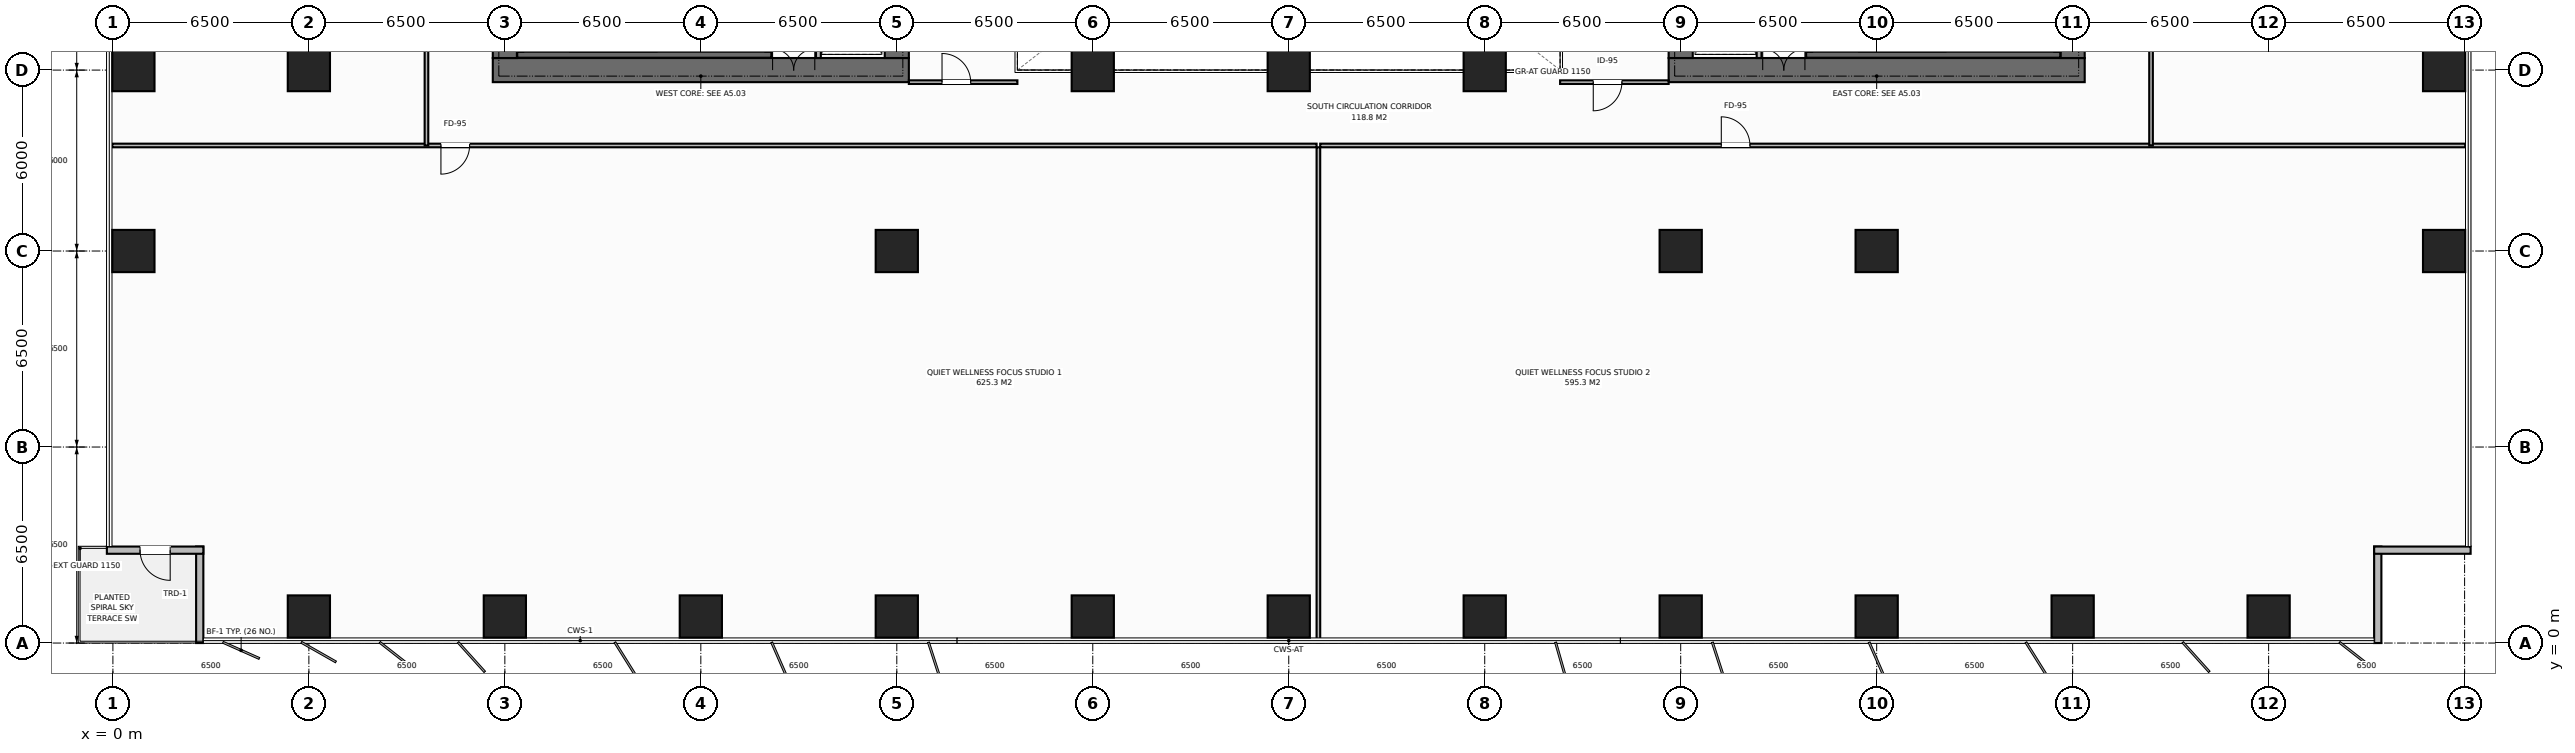
"""IFC4 building model, lengths in metres.
Left out: names, types, materials, properties, quantities, classifications, styles, units other than length and angle.
Written with IfcOpenShell. Run it as: python <this file> out.ifc"""

import sys

from ifc_helpers import new_model, si_unit, direction, frame, frame_2d, origin, origin_2d, place, context, subcontext, project, spatial, rectangle, extrude, element, fill, save


model = new_model("IFC4")
c1 = context("Model", 3, precision=1e-05, world=origin(), true_north=direction((0.0, 1.0)))
c2 = subcontext(c1, "Body", "Model", "MODEL_VIEW")
j1 = project(units=[si_unit("LENGTHUNIT", "METRE"), si_unit("PLANEANGLEUNIT", "RADIAN")], contexts=[c1])
p1 = place(None, origin())
s1 = spatial("IfcSite", under=j1, at=p1, CompositionType="ELEMENT")
p2 = place(p1, origin())
s2 = spatial("IfcBuilding", under=s1, at=p2, CompositionType="ELEMENT")
p3 = place(p2, frame((0.0, 0.0, 31.6)))
s3 = spatial("IfcBuildingStorey", under=s2, at=p3, CompositionType="ELEMENT", Elevation=31.6)
p4 = place(p3, frame((12.6, 19.0, 0.0), z_axis=(0.0, 0.0, 1.0), x_axis=(1.0, 0.0, 0.0)))
e1 = element("IfcWall", 1, at=p4, inside=s3, PredefinedType="SHEAR", context=c2, shape_type="SweptSolid", body=[
    extrude(rectangle(XDim=13.8, YDim=0.8, at=frame_2d((6.9, 0.0))), origin(), (0.0, 0.0, 1.0), 3.8),
])
p5 = place(p4, frame((9.28, 0.0, 0.0)))
e2 = element("IfcOpeningElement", 2, at=p5, cuts=e1, PredefinedType="OPENING", context=c2, shape_type="SweptSolid", body=[
    extrude(rectangle(XDim=1.4, YDim=2.2, at=frame_2d((0.7, 1.1))), frame((0.0, 0.41, 0.0), z_axis=(0.0, -1.0, 0.0), x_axis=(1.0, 0.0, 0.0)), (0.0, 0.0, 1.0), 0.82),
])
p6 = place(p3, frame((13.0, 19.4, 0.0), z_axis=(0.0, 0.0, 1.0), x_axis=(0.0, 1.0, 0.0)))
e3 = element("IfcWall", 3, at=p6, inside=s3, PredefinedType="SHEAR", context=c2, shape_type="SweptSolid", body=[
    extrude(rectangle(XDim=13.2, YDim=0.8, at=frame_2d((6.6, 0.0))), origin(), (0.0, 0.0, 1.0), 3.8),
])
p7 = place(p6, frame((4.65, 0.0, 0.0)))
e4 = element("IfcOpeningElement", 4, at=p7, cuts=e3, PredefinedType="OPENING", context=c2, shape_type="SweptSolid", body=[
    extrude(rectangle(XDim=1.4, YDim=2.2, at=frame_2d((0.7, 1.1))), frame((0.0, 0.41, 0.0), z_axis=(0.0, -1.0, 0.0), x_axis=(1.0, 0.0, 0.0)), (0.0, 0.0, 1.0), 0.82),
])
p8 = place(p3, frame((26.0, 19.4, 0.0), z_axis=(0.0, 0.0, 1.0), x_axis=(0.0, 1.0, 0.0)))
e5 = element("IfcWall", 5, at=p8, inside=s3, PredefinedType="SHEAR", context=c2, shape_type="SweptSolid", body=[
    extrude(rectangle(XDim=13.2, YDim=0.8, at=frame_2d((6.6, 0.0))), origin(), (0.0, 0.0, 1.0), 3.8),
])
p9 = place(p3, frame((51.6, 19.0, 0.0), z_axis=(0.0, 0.0, 1.0), x_axis=(1.0, 0.0, 0.0)))
e6 = element("IfcWall", 6, at=p9, inside=s3, PredefinedType="SHEAR", context=c2, shape_type="SweptSolid", body=[
    extrude(rectangle(XDim=13.8, YDim=0.8, at=frame_2d((6.9, 0.0))), origin(), (0.0, 0.0, 1.0), 3.8),
])
p10 = place(p9, frame((3.12, 0.0, 0.0)))
e7 = element("IfcOpeningElement", 7, at=p10, cuts=e6, PredefinedType="OPENING", context=c2, shape_type="SweptSolid", body=[
    extrude(rectangle(XDim=1.4, YDim=2.2, at=frame_2d((0.7, 1.1))), frame((0.0, 0.41, 0.0), z_axis=(0.0, -1.0, 0.0), x_axis=(1.0, 0.0, 0.0)), (0.0, 0.0, 1.0), 0.82),
])
p11 = place(p3, frame((52.0, 19.4, 0.0), z_axis=(0.0, 0.0, 1.0), x_axis=(0.0, 1.0, 0.0)))
e8 = element("IfcWall", 8, at=p11, inside=s3, PredefinedType="SHEAR", context=c2, shape_type="SweptSolid", body=[
    extrude(rectangle(XDim=13.2, YDim=0.8, at=frame_2d((6.6, 0.0))), origin(), (0.0, 0.0, 1.0), 3.8),
])
p12 = place(p3, frame((65.0, 19.4, 0.0), z_axis=(0.0, 0.0, 1.0), x_axis=(0.0, 1.0, 0.0)))
e9 = element("IfcWall", 9, at=p12, inside=s3, PredefinedType="SHEAR", context=c2, shape_type="SweptSolid", body=[
    extrude(rectangle(XDim=13.2, YDim=0.8, at=frame_2d((6.6, 0.0))), origin(), (0.0, 0.0, 1.0), 3.8),
])
p13 = place(p12, frame((8.05, 0.0, 0.0)))
e10 = element("IfcOpeningElement", 10, at=p13, cuts=e9, PredefinedType="OPENING", context=c2, shape_type="SweptSolid", body=[
    extrude(rectangle(XDim=1.3, YDim=2.2, at=frame_2d((0.65, 1.1))), frame((0.0, 0.41, 0.0), z_axis=(0.0, -1.0, 0.0), x_axis=(1.0, 0.0, 0.0)), (0.0, 0.0, 1.0), 0.82),
])
for number, where, z_axis, x_axis in (
    (11, (13.41, 19.51, 0.0), (0.0, 0.0, 1.0), (1.0, 0.0, 0.0)),
    (12, (56.16, 19.51, 0.0), (0.0, 0.0, 1.0), (1.0, 0.0, 0.0)),
):
    element("IfcWall", number, at=place(p3, frame(where, z_axis=z_axis, x_axis=x_axis)), inside=s3, PredefinedType="SHEAR", context=c2, shape_type="SweptSolid", body=[
        extrude(rectangle(XDim=8.43, YDim=0.2, at=frame_2d((4.215, 0.0))), origin(), (0.0, 0.0, 1.0), 3.8),
    ])
for number, where, z_axis, x_axis in (
    (13, (58.5, 13.0, 0.0), (0.0, 0.0, 1.0), (1.0, 0.0, 0.0)),
    (14, (6.5, 19.0, 0.0), (0.0, 0.0, 1.0), (1.0, 0.0, 0.0)),
    (15, (32.5, 19.0, 0.0), (0.0, 0.0, 1.0), (1.0, 0.0, 0.0)),
    (16, (39.0, 19.0, 0.0), (0.0, 0.0, 1.0), (1.0, 0.0, 0.0)),
    (17, (45.5, 19.0, 0.0), (0.0, 0.0, 1.0), (1.0, 0.0, 0.0)),
    (18, (26.0, 13.0, 0.0), (0.0, 0.0, 1.0), (1.0, 0.0, 0.0)),
    (19, (52.0, 13.0, 0.0), (0.0, 0.0, 1.0), (1.0, 0.0, 0.0)),
    (20, (6.5, 0.88, 0.0), (0.0, 0.0, 1.0), (1.0, 0.0, 0.0)),
    (21, (13.0, 0.88, 0.0), (0.0, 0.0, 1.0), (1.0, 0.0, 0.0)),
    (22, (19.5, 0.88, 0.0), (0.0, 0.0, 1.0), (1.0, 0.0, 0.0)),
    (23, (26.0, 0.88, 0.0), (0.0, 0.0, 1.0), (1.0, 0.0, 0.0)),
    (24, (32.5, 0.88, 0.0), (0.0, 0.0, 1.0), (1.0, 0.0, 0.0)),
    (25, (39.0, 0.88, 0.0), (0.0, 0.0, 1.0), (1.0, 0.0, 0.0)),
    (26, (45.5, 0.88, 0.0), (0.0, 0.0, 1.0), (1.0, 0.0, 0.0)),
    (27, (52.0, 0.88, 0.0), (0.0, 0.0, 1.0), (1.0, 0.0, 0.0)),
    (28, (58.5, 0.88, 0.0), (0.0, 0.0, 1.0), (1.0, 0.0, 0.0)),
    (29, (65.0, 0.88, 0.0), (0.0, 0.0, 1.0), (1.0, 0.0, 0.0)),
    (30, (71.5, 0.88, 0.0), (0.0, 0.0, 1.0), (1.0, 0.0, 0.0)),
    (31, (0.68, 13.0, 0.0), (0.0, 0.0, 1.0), (1.0, 0.0, 0.0)),
    (32, (77.32, 13.0, 0.0), (0.0, 0.0, 1.0), (1.0, 0.0, 0.0)),
    (33, (0.68, 19.0, 0.0), (0.0, 0.0, 1.0), (1.0, 0.0, 0.0)),
    (34, (77.32, 19.0, 0.0), (0.0, 0.0, 1.0), (1.0, 0.0, 0.0)),
):
    element("IfcColumn", number, at=place(p3, frame(where, z_axis=z_axis, x_axis=x_axis)), inside=s3, PredefinedType="COLUMN", context=c2, shape_type="SweptSolid", body=[
        extrude(rectangle(XDim=1.4, YDim=1.4, at=origin_2d()), origin(), (0.0, 0.0, 1.0), 3.8),
    ])
p14 = place(p3, frame((2.88, 0.0, 0.0), z_axis=(0.0, 0.0, 1.0), x_axis=(0.0, 1.0, 0.0)))
e35 = element("IfcWall", 35, at=p14, inside=s3, PredefinedType="STANDARD", context=c2, shape_type="SweptSolid", body=[
    extrude(rectangle(XDim=3.2, YDim=0.24, at=frame_2d((1.6, 0.0))), origin(), (0.0, 0.0, 1.0), 3.55),
])
p15 = place(p3, frame((3.0, 3.08, 0.0), z_axis=(0.0, 0.0, 1.0), x_axis=(-1.0, 0.0, 0.0)))
e36 = element("IfcWall", 36, at=p15, inside=s3, PredefinedType="STANDARD", context=c2, shape_type="SweptSolid", body=[
    extrude(rectangle(XDim=3.2, YDim=0.24, at=frame_2d((1.6, 0.0))), origin(), (0.0, 0.0, 1.0), 3.55),
])
p16 = place(p15, frame((1.1, 0.0, 0.0)))
e37 = element("IfcOpeningElement", 37, at=p16, cuts=e36, PredefinedType="OPENING", context=c2, shape_type="SweptSolid", body=[
    extrude(rectangle(XDim=1.0, YDim=2.2, at=frame_2d((0.5, 1.1))), frame((0.0, 0.13, 0.0), z_axis=(0.0, -1.0, 0.0), x_axis=(1.0, 0.0, 0.0)), (0.0, 0.0, 1.0), 0.26),
])
for number, where, z_axis, x_axis in (
    (38, (75.12, 3.2, 0.0), (0.0, 0.0, 1.0), (0.0, -1.0, 0.0)),
    (39, (78.2, 3.08, 0.0), (0.0, 0.0, 1.0), (-1.0, 0.0, 0.0)),
):
    element("IfcWall", number, at=place(p3, frame(where, z_axis=z_axis, x_axis=x_axis)), inside=s3, PredefinedType="STANDARD", context=c2, shape_type="SweptSolid", body=[
        extrude(rectangle(XDim=3.2, YDim=0.24, at=frame_2d((1.6, 0.0))), origin(), (0.0, 0.0, 1.0), 3.55),
    ])
p17 = place(p3, frame((23.4, 19.4, 0.0), z_axis=(0.0, 0.0, 1.0), x_axis=(0.0, 1.0, 0.0)))
e40 = element("IfcWall", 40, at=p17, inside=s3, PredefinedType="STANDARD", context=c2, shape_type="SweptSolid", body=[
    extrude(rectangle(XDim=13.2, YDim=0.16, at=frame_2d((6.6, 0.0))), origin(), (0.0, 0.0, 1.0), 3.55),
])
p18 = place(p17, frame((0.55, 0.0, 0.0)))
e41 = element("IfcOpeningElement", 41, at=p18, cuts=e40, PredefinedType="OPENING", context=c2, shape_type="SweptSolid", body=[
    extrude(rectangle(XDim=1.1, YDim=2.2, at=frame_2d((0.55, 1.1))), frame((0.0, 0.09, 0.0), z_axis=(0.0, -1.0, 0.0), x_axis=(1.0, 0.0, 0.0)), (0.0, 0.0, 1.0), 0.18),
])
p19 = place(p17, frame((2.7, 0.0, 0.0)))
e42 = element("IfcOpeningElement", 42, at=p19, cuts=e40, PredefinedType="OPENING", context=c2, shape_type="SweptSolid", body=[
    extrude(rectangle(XDim=1.1, YDim=2.2, at=frame_2d((0.55, 1.1))), frame((0.0, 0.09, 0.0), z_axis=(0.0, -1.0, 0.0), x_axis=(1.0, 0.0, 0.0)), (0.0, 0.0, 1.0), 0.18),
])
p20 = place(p3, frame((54.6, 19.4, 0.0), z_axis=(0.0, 0.0, 1.0), x_axis=(0.0, 1.0, 0.0)))
e43 = element("IfcWall", 43, at=p20, inside=s3, PredefinedType="STANDARD", context=c2, shape_type="SweptSolid", body=[
    extrude(rectangle(XDim=13.2, YDim=0.16, at=frame_2d((6.6, 0.0))), origin(), (0.0, 0.0, 1.0), 3.55),
])
p21 = place(p20, frame((0.55, 0.0, 0.0)))
e44 = element("IfcOpeningElement", 44, at=p21, cuts=e43, PredefinedType="OPENING", context=c2, shape_type="SweptSolid", body=[
    extrude(rectangle(XDim=1.1, YDim=2.2, at=frame_2d((0.55, 1.1))), frame((0.0, 0.09, 0.0), z_axis=(0.0, -1.0, 0.0), x_axis=(1.0, 0.0, 0.0)), (0.0, 0.0, 1.0), 0.18),
])
p22 = place(p20, frame((2.7, 0.0, 0.0)))
e45 = element("IfcOpeningElement", 45, at=p22, cuts=e43, PredefinedType="OPENING", context=c2, shape_type="SweptSolid", body=[
    extrude(rectangle(XDim=1.1, YDim=2.2, at=frame_2d((0.55, 1.1))), frame((0.0, 0.09, 0.0), z_axis=(0.0, -1.0, 0.0), x_axis=(1.0, 0.0, 0.0)), (0.0, 0.0, 1.0), 0.18),
])
p23 = place(p3, frame((26.4, 18.6, 0.0), z_axis=(0.0, 0.0, 1.0), x_axis=(1.0, 0.0, 0.0)))
e46 = element("IfcWall", 46, at=p23, inside=s3, PredefinedType="PARTITIONING", context=c2, shape_type="SweptSolid", body=[
    extrude(rectangle(XDim=3.6, YDim=0.12, at=frame_2d((1.8, 0.0))), origin(), (0.0, 0.0, 1.0), 3.55),
])
p24 = place(p23, frame((1.1, 0.0, 0.0)))
e47 = element("IfcOpeningElement", 47, at=p24, cuts=e46, PredefinedType="OPENING", context=c2, shape_type="SweptSolid", body=[
    extrude(rectangle(XDim=0.95, YDim=2.15, at=frame_2d((0.475, 1.075))), frame((0.0, 0.07, 0.0), z_axis=(0.0, -1.0, 0.0), x_axis=(1.0, 0.0, 0.0)), (0.0, 0.0, 1.0), 0.14),
])
p25 = place(p3, frame((48.0, 18.6, 0.0), z_axis=(0.0, 0.0, 1.0), x_axis=(1.0, 0.0, 0.0)))
e48 = element("IfcWall", 48, at=p25, inside=s3, PredefinedType="PARTITIONING", context=c2, shape_type="SweptSolid", body=[
    extrude(rectangle(XDim=3.6, YDim=0.12, at=frame_2d((1.8, 0.0))), origin(), (0.0, 0.0, 1.0), 3.55),
])
p26 = place(p25, frame((1.1, 0.0, 0.0)))
e49 = element("IfcOpeningElement", 49, at=p26, cuts=e48, PredefinedType="OPENING", context=c2, shape_type="SweptSolid", body=[
    extrude(rectangle(XDim=0.95, YDim=2.15, at=frame_2d((0.475, 1.075))), frame((0.0, 0.07, 0.0), z_axis=(0.0, -1.0, 0.0), x_axis=(1.0, 0.0, 0.0)), (0.0, 0.0, 1.0), 0.14),
])
p27 = place(p3, frame((39.983, 0.02, 0.0), z_axis=(0.0, 0.0, 1.0), x_axis=(0.0, 1.0, 0.0)))
e50 = element("IfcWall", 50, at=p27, inside=s3, PredefinedType="PARTITIONING", context=c2, shape_type="SweptSolid", body=[
    extrude(rectangle(XDim=16.42, YDim=0.12, at=frame_2d((8.21, 0.0))), origin(), (0.0, 0.0, 1.0), 3.55),
])
p28 = place(p3, frame((-0.02, 16.5, 0.0), z_axis=(0.0, 0.0, 1.0), x_axis=(1.0, 0.0, 0.0)))
e51 = element("IfcWall", 51, at=p28, inside=s3, PredefinedType="PARTITIONING", context=c2, shape_type="SweptSolid", body=[
    extrude(rectangle(XDim=39.943, YDim=0.12, at=frame_2d((19.972, 0.0))), origin(), (0.0, 0.0, 1.0), 3.55),
])
p29 = place(p28, frame((10.9, 0.0, 0.0)))
e52 = element("IfcOpeningElement", 52, at=p29, cuts=e51, PredefinedType="OPENING", context=c2, shape_type="SweptSolid", body=[
    extrude(rectangle(XDim=0.95, YDim=2.15, at=frame_2d((0.475, 1.075))), frame((0.0, 0.07, 0.0), z_axis=(0.0, -1.0, 0.0), x_axis=(1.0, 0.0, 0.0)), (0.0, 0.0, 1.0), 0.14),
])
p30 = place(p3, frame((40.043, 16.5, 0.0), z_axis=(0.0, 0.0, 1.0), x_axis=(1.0, 0.0, 0.0)))
e53 = element("IfcWall", 53, at=p30, inside=s3, PredefinedType="PARTITIONING", context=c2, shape_type="SweptSolid", body=[
    extrude(rectangle(XDim=37.977, YDim=0.12, at=frame_2d((18.988, 0.0))), origin(), (0.0, 0.0, 1.0), 3.55),
])
p31 = place(p30, frame((13.303, 0.0, 0.0)))
e54 = element("IfcOpeningElement", 54, at=p31, cuts=e53, PredefinedType="OPENING", context=c2, shape_type="SweptSolid", body=[
    extrude(rectangle(XDim=0.95, YDim=2.15, at=frame_2d((0.475, 1.075))), frame((0.0, 0.07, 0.0), z_axis=(0.0, -1.0, 0.0), x_axis=(1.0, 0.0, 0.0)), (0.0, 0.0, 1.0), 0.14),
])
p32 = place(p3, frame((10.4, 16.5, 0.0), z_axis=(0.0, 0.0, 1.0), x_axis=(0.0, 1.0, 0.0)))
e55 = element("IfcWall", 55, at=p32, inside=s3, PredefinedType="PARTITIONING", context=c2, shape_type="SweptSolid", body=[
    extrude(rectangle(XDim=19.0, YDim=0.12, at=frame_2d((9.5, 0.0))), origin(), (0.0, 0.0, 1.0), 3.55),
])
p33 = place(p32, frame((9.025, 0.0, 0.0)))
e56 = element("IfcOpeningElement", 56, at=p33, cuts=e55, PredefinedType="OPENING", context=c2, shape_type="SweptSolid", body=[
    extrude(rectangle(XDim=0.95, YDim=2.15, at=frame_2d((0.475, 1.075))), frame((0.0, 0.07, 0.0), z_axis=(0.0, -1.0, 0.0), x_axis=(1.0, 0.0, 0.0)), (0.0, 0.0, 1.0), 0.14),
])
p34 = place(p3, frame((67.6, 16.5, 0.0), z_axis=(0.0, 0.0, 1.0), x_axis=(0.0, 1.0, 0.0)))
e57 = element("IfcWall", 57, at=p34, inside=s3, PredefinedType="PARTITIONING", context=c2, shape_type="SweptSolid", body=[
    extrude(rectangle(XDim=9.5, YDim=0.12, at=frame_2d((4.75, 0.0))), origin(), (0.0, 0.0, 1.0), 3.55),
])
p35 = place(p34, frame((5.325, 0.0, 0.0)))
e58 = element("IfcOpeningElement", 58, at=p35, cuts=e57, PredefinedType="OPENING", context=c2, shape_type="SweptSolid", body=[
    extrude(rectangle(XDim=0.95, YDim=2.15, at=frame_2d((0.475, 1.075))), frame((0.0, 0.07, 0.0), z_axis=(0.0, -1.0, 0.0), x_axis=(1.0, 0.0, 0.0)), (0.0, 0.0, 1.0), 0.14),
])
p36 = place(p16, origin())
e59 = element("IfcDoor", 59, at=p36, inside=s3, OperationType="SINGLE_SWING_LEFT", PredefinedType="DOOR", context=c2, shape_type="SweptSolid", body=[
    extrude(rectangle(XDim=1.0, YDim=2.2, at=frame_2d((0.5, 1.1))), frame((0.0, 0.025, 0.0), z_axis=(0.0, -1.0, 0.0), x_axis=(1.0, 0.0, 0.0)), (0.0, 0.0, 1.0), 0.05),
])
fill(e37, e59)
p37 = place(p5, origin())
e60 = element("IfcDoor", 60, at=p37, inside=s3, OperationType="DOUBLE_DOOR_SINGLE_SWING", PredefinedType="DOOR", context=c2, shape_type="SweptSolid", body=[
    extrude(rectangle(XDim=1.4, YDim=2.2, at=frame_2d((0.7, 1.1))), frame((0.0, 0.125, 0.0), z_axis=(0.0, -1.0, 0.0), x_axis=(1.0, 0.0, 0.0)), (0.0, 0.0, 1.0), 0.05),
])
fill(e2, e60)
p38 = place(p10, origin())
e61 = element("IfcDoor", 61, at=p38, inside=s3, OperationType="DOUBLE_DOOR_SINGLE_SWING", PredefinedType="DOOR", context=c2, shape_type="SweptSolid", body=[
    extrude(rectangle(XDim=1.4, YDim=2.2, at=frame_2d((0.7, 1.1))), frame((0.0, 0.125, 0.0), z_axis=(0.0, -1.0, 0.0), x_axis=(1.0, 0.0, 0.0)), (0.0, 0.0, 1.0), 0.05),
])
fill(e7, e61)
p39 = place(p24, origin())
e62 = element("IfcDoor", 62, at=p39, inside=s3, OperationType="SINGLE_SWING_LEFT", PredefinedType="DOOR", context=c2, shape_type="SweptSolid", body=[
    extrude(rectangle(XDim=0.95, YDim=2.15, at=frame_2d((0.475, 1.075))), frame((0.0, 0.025, 0.0), z_axis=(0.0, -1.0, 0.0), x_axis=(1.0, 0.0, 0.0)), (0.0, 0.0, 1.0), 0.05),
])
fill(e47, e62)
p40 = place(p26, origin())
e63 = element("IfcDoor", 63, at=p40, inside=s3, OperationType="SINGLE_SWING_RIGHT", PredefinedType="DOOR", context=c2, shape_type="SweptSolid", body=[
    extrude(rectangle(XDim=0.95, YDim=2.15, at=frame_2d((0.475, 1.075))), frame((0.0, 0.025, 0.0), z_axis=(0.0, -1.0, 0.0), x_axis=(1.0, 0.0, 0.0)), (0.0, 0.0, 1.0), 0.05),
])
fill(e49, e63)
p41 = place(p29, origin())
e64 = element("IfcDoor", 64, at=p41, inside=s3, OperationType="SINGLE_SWING_RIGHT", PredefinedType="DOOR", context=c2, shape_type="SweptSolid", body=[
    extrude(rectangle(XDim=0.95, YDim=2.15, at=frame_2d((0.475, 1.075))), frame((0.0, 0.025, 0.0), z_axis=(0.0, -1.0, 0.0), x_axis=(1.0, 0.0, 0.0)), (0.0, 0.0, 1.0), 0.05),
])
fill(e52, e64)
p42 = place(p31, origin())
e65 = element("IfcDoor", 65, at=p42, inside=s3, OperationType="SINGLE_SWING_LEFT", PredefinedType="DOOR", context=c2, shape_type="SweptSolid", body=[
    extrude(rectangle(XDim=0.95, YDim=2.15, at=frame_2d((0.475, 1.075))), frame((0.0, 0.025, 0.0), z_axis=(0.0, -1.0, 0.0), x_axis=(1.0, 0.0, 0.0)), (0.0, 0.0, 1.0), 0.05),
])
fill(e54, e65)
save(model, sys.argv[1])
